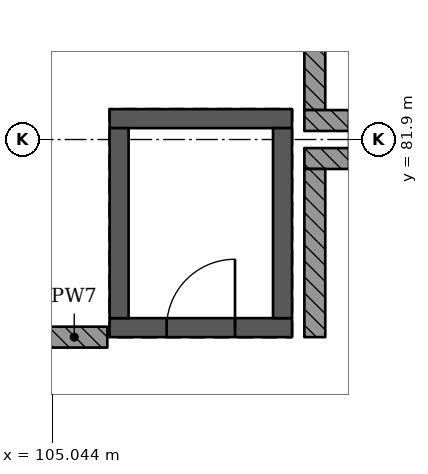
"""IFC4 building model, lengths in metres.
Left out: names, types, materials, properties, quantities, classifications, styles, units other than length and angle.
Written with IfcOpenShell. Run it as: python <this file> out.ifc"""

import sys

from ifc_helpers import new_model, si_unit, direction, frame, frame_2d, origin, place, context, subcontext, project, spatial, rectangle, extrude, element, fill, save


model = new_model("IFC4")
c1 = context("Model", 3, precision=1e-05, world=origin(), true_north=direction((0.0, 1.0)))
c2 = subcontext(c1, "Body", "Model", "MODEL_VIEW")
j1 = project(units=[si_unit("LENGTHUNIT", "METRE"), si_unit("PLANEANGLEUNIT", "RADIAN")], contexts=[c1])
p1 = place(None, origin())
s1 = spatial("IfcSite", under=j1, at=p1, CompositionType="ELEMENT")
p2 = place(p1, origin())
s2 = spatial("IfcBuilding", under=s1, at=p2, CompositionType="ELEMENT")
p3 = place(p2, frame((0.0, 0.0, 29.12)))
s3 = spatial("IfcBuildingStorey", under=s2, at=p3, CompositionType="ELEMENT", Elevation=29.12)
p4 = place(p3, frame((108.2, 79.425, 0.0), z_axis=(0.0, 0.0, 1.0), x_axis=(-1.0, 0.0, 0.0)))
e1 = element("IfcWall", 1, at=p4, inside=s3, PredefinedType="SHEAR", context=c2, shape_type="SweptSolid", body=[
    extrude(rectangle(XDim=2.4, YDim=0.25, at=frame_2d((1.2, 0.0))), origin(), (0.0, 0.0, 1.0), 4.55),
])
p5 = place(p4, frame((0.75, 0.0, 0.0)))
e2 = element("IfcOpeningElement", 2, at=p5, cuts=e1, PredefinedType="OPENING", context=c2, shape_type="SweptSolid", body=[
    extrude(rectangle(XDim=0.9, YDim=2.1, at=frame_2d((0.45, 1.05))), frame((0.0, 0.135, 0.0), z_axis=(0.0, -1.0, 0.0), x_axis=(1.0, 0.0, 0.0)), (0.0, 0.0, 1.0), 0.27),
])
p6 = place(p3, frame((108.2, 82.175, 0.0), z_axis=(0.0, 0.0, 1.0), x_axis=(-1.0, 0.0, 0.0)))
e3 = element("IfcWall", 3, at=p6, inside=s3, PredefinedType="SHEAR", context=c2, shape_type="SweptSolid", body=[
    extrude(rectangle(XDim=2.4, YDim=0.25, at=frame_2d((1.2, 0.0))), origin(), (0.0, 0.0, 1.0), 4.55),
])
for number, where, z_axis, x_axis in (
    (4, (105.925, 82.05, 0.0), (0.0, 0.0, 1.0), (0.0, -1.0, 0.0)),
    (5, (108.075, 82.05, 0.0), (0.0, 0.0, 1.0), (0.0, -1.0, 0.0)),
):
    element("IfcWall", number, at=place(p3, frame(where, z_axis=z_axis, x_axis=x_axis)), inside=s3, PredefinedType="SHEAR", context=c2, shape_type="SweptSolid", body=[
        extrude(rectangle(XDim=2.5, YDim=0.25, at=frame_2d((1.25, 0.0))), origin(), (0.0, 0.0, 1.0), 4.55),
    ])
p7 = place(p3, frame((105.77, 79.3, 0.0), z_axis=(0.0, 0.0, 1.0), x_axis=(-1.0, 0.0, 0.0)))
e6 = element("IfcWall", 6, at=p7, inside=s3, PredefinedType="SOLIDWALL", context=c2, shape_type="SweptSolid", body=[
    extrude(rectangle(XDim=0.87, YDim=0.275, at=frame_2d((0.435, 0.0))), origin(), (0.0, 0.0, 1.0), 3.88),
])
p8 = place(p3, frame((108.363, 81.65, 0.0), z_axis=(0.0, 0.0, 1.0), x_axis=(1.0, 0.0, 0.0)))
e7 = element("IfcWall", 7, at=p8, inside=s3, PredefinedType="SOLIDWALL", context=c2, shape_type="SweptSolid", body=[
    extrude(rectangle(XDim=0.587, YDim=0.275, at=frame_2d((0.294, 0.0))), origin(), (0.0, 0.0, 1.0), 3.88),
])
p9 = place(p3, frame((108.5, 79.3, 0.0), z_axis=(0.0, 0.0, 1.0), x_axis=(0.0, 1.0, 0.0)))
e8 = element("IfcWall", 8, at=p9, inside=s3, PredefinedType="SOLIDWALL", context=c2, shape_type="SweptSolid", body=[
    extrude(rectangle(XDim=2.212, YDim=0.275, at=frame_2d((1.106, 0.0))), origin(), (0.0, 0.0, 1.0), 3.88),
])
p10 = place(p3, frame((108.5, 82.288, 0.0), z_axis=(0.0, 0.0, 1.0), x_axis=(0.0, 1.0, 0.0)))
e9 = element("IfcWall", 9, at=p10, inside=s3, PredefinedType="SOLIDWALL", context=c2, shape_type="SweptSolid", body=[
    extrude(rectangle(XDim=6.975, YDim=0.275, at=frame_2d((3.487, 0.0))), origin(), (0.0, 0.0, 1.0), 3.88),
])
p11 = place(p3, frame((108.95, 82.15, 0.0), z_axis=(0.0, 0.0, 1.0), x_axis=(-1.0, 0.0, 0.0)))
e10 = element("IfcWall", 10, at=p11, inside=s3, PredefinedType="SOLIDWALL", context=c2, shape_type="SweptSolid", body=[
    extrude(rectangle(XDim=0.587, YDim=0.275, at=frame_2d((0.294, 0.0))), origin(), (0.0, 0.0, 1.0), 3.88),
])
p12 = place(p5, origin())
e11 = element("IfcDoor", 11, at=p12, inside=s3, OperationType="SINGLE_SWING_LEFT", PredefinedType="DOOR", context=c2, shape_type="SweptSolid", body=[
    extrude(rectangle(XDim=0.9, YDim=2.1, at=frame_2d((0.45, 1.05))), frame((0.0, 0.025, 0.0), z_axis=(0.0, -1.0, 0.0), x_axis=(1.0, 0.0, 0.0)), (0.0, 0.0, 1.0), 0.05),
])
fill(e2, e11)
save(model, sys.argv[1])
